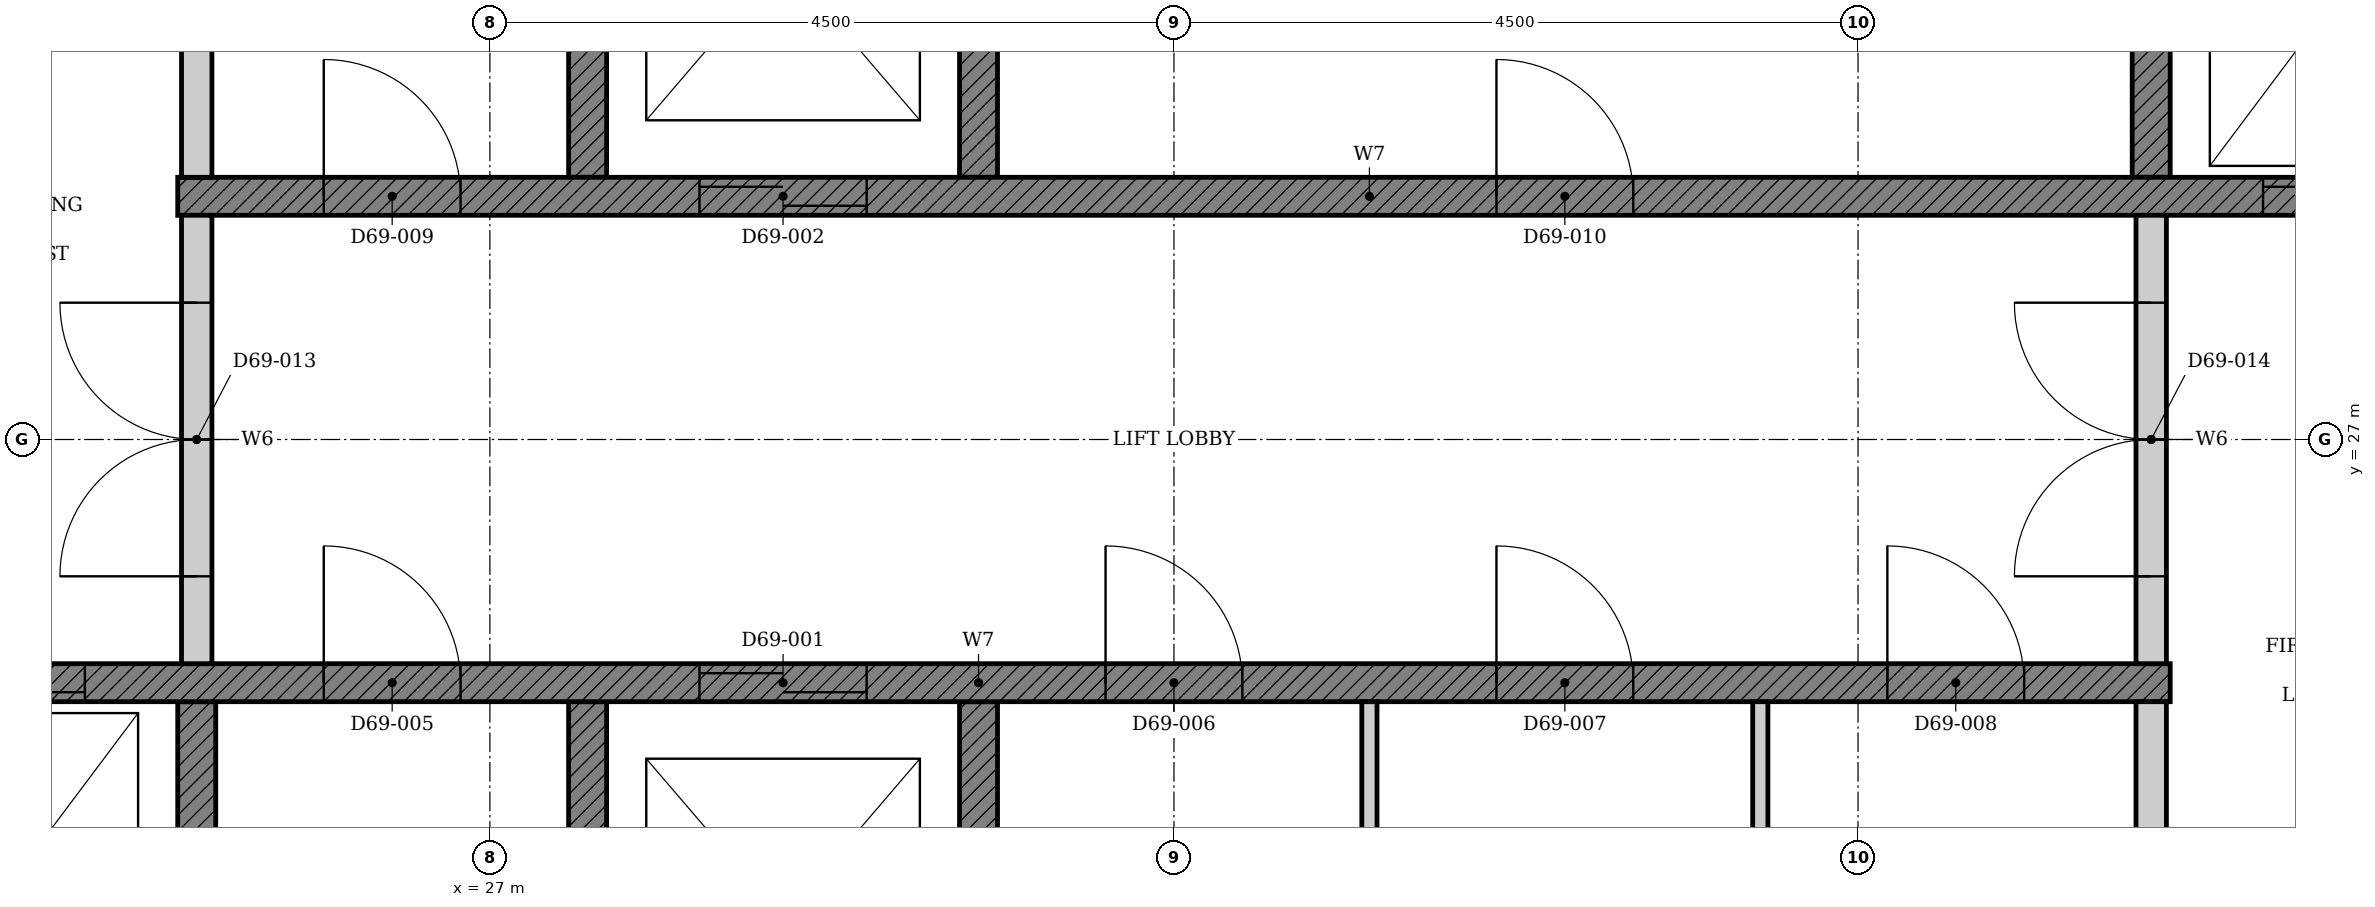
"""IFC4 building model, lengths in metres.
Left out: names, types, materials, properties, quantities, classifications, styles, units other than length and angle.
Written with IfcOpenShell. Run it as: python <this file> out.ifc"""

import sys

from ifc_helpers import new_model, si_unit, direction, frame, frame_2d, origin, place, context, subcontext, project, spatial, polyline, rectangle, outline, extrude, element, fill, save


model = new_model("IFC4")
c1 = context("Model", 3, precision=1e-05, world=origin(), true_north=direction((0.0, 1.0)))
c2 = subcontext(c1, "Body", "Model", "MODEL_VIEW")
j1 = project(units=[si_unit("LENGTHUNIT", "METRE"), si_unit("PLANEANGLEUNIT", "RADIAN")], contexts=[c1])
p1 = place(None, origin())
s1 = spatial("IfcSite", under=j1, at=p1, CompositionType="ELEMENT")
p2 = place(p1, origin())
s2 = spatial("IfcBuilding", under=s1, at=p2, CompositionType="ELEMENT")
p3 = place(p2, frame((0.0, 0.0, 271.2)))
s3 = spatial("IfcBuildingStorey", under=s2, at=p3, CompositionType="ELEMENT", Elevation=271.2)
p4 = place(p3, origin())
e1 = element("IfcWall", 1, at=p4, inside=s3, PredefinedType="SHEAR", context=c2, shape_type="SweptSolid", body=[
    extrude(outline(polyline([(22.375, 22.35), (25.197, 22.35), (25.197, 25.275), (24.947, 25.275), (24.947, 22.65), (22.625, 22.65), (22.625, 25.275), (22.375, 25.275), (22.375, 22.35)])), origin(), (0.0, 0.0, 1.0), 3.4),
])
p5 = place(p3, origin())
e2 = element("IfcWall", 2, at=p5, inside=s3, PredefinedType="SHEAR", context=c2, shape_type="SweptSolid", body=[
    extrude(outline(polyline([(27.518, 22.35), (30.339, 22.35), (30.339, 25.275), (30.089, 25.275), (30.089, 22.65), (27.768, 22.65), (27.768, 25.275), (27.518, 25.275), (27.518, 22.35)])), origin(), (0.0, 0.0, 1.0), 3.4),
])
p6 = place(p3, origin())
e3 = element("IfcWall", 3, at=p6, inside=s3, PredefinedType="SHEAR", context=c2, shape_type="SweptSolid", body=[
    extrude(outline(polyline([(27.518, 28.725), (27.768, 28.725), (27.768, 31.35), (30.089, 31.35), (30.089, 28.725), (30.339, 28.725), (30.339, 31.65), (27.518, 31.65), (27.518, 28.725)])), origin(), (0.0, 0.0, 1.0), 3.4),
])
p7 = place(p3, origin())
e4 = element("IfcWall", 4, at=p7, inside=s3, PredefinedType="SHEAR", context=c2, shape_type="SweptSolid", body=[
    extrude(outline(polyline([(37.803, 28.725), (38.053, 28.725), (38.053, 31.35), (40.375, 31.35), (40.375, 28.725), (40.625, 28.725), (40.625, 31.65), (37.803, 31.65), (37.803, 28.725)])), origin(), (0.0, 0.0, 1.0), 3.4),
])
p8 = place(p3, frame((22.375, 25.4, 0.0), z_axis=(0.0, 0.0, 1.0), x_axis=(1.0, 0.0, 0.0)))
e5 = element("IfcWall", 5, at=p8, inside=s3, PredefinedType="SHEAR", context=c2, shape_type="SweptSolid", body=[
    extrude(rectangle(XDim=15.678, YDim=0.25, at=frame_2d((7.839, 0.0))), origin(), (0.0, 0.0, 1.0), 3.4),
])
p9 = place(p8, frame((6.004, 0.0, 0.0)))
e6 = element("IfcOpeningElement", 6, at=p9, cuts=e5, PredefinedType="OPENING", context=c2, shape_type="SweptSolid", body=[
    extrude(rectangle(XDim=1.1, YDim=2.1, at=frame_2d((0.55, 1.05))), frame((0.0, 0.135, 0.0), z_axis=(0.0, -1.0, 0.0), x_axis=(1.0, 0.0, 0.0)), (0.0, 0.0, 1.0), 0.27),
])
p10 = place(p8, frame((0.861, 0.0, 0.0)))
e7 = element("IfcOpeningElement", 7, at=p10, cuts=e5, PredefinedType="OPENING", context=c2, shape_type="SweptSolid", body=[
    extrude(rectangle(XDim=1.1, YDim=2.1, at=frame_2d((0.55, 1.05))), frame((0.0, 0.135, 0.0), z_axis=(0.0, -1.0, 0.0), x_axis=(1.0, 0.0, 0.0)), (0.0, 0.0, 1.0), 0.27),
])
p11 = place(p8, frame((3.532, 0.0, 0.0)))
e8 = element("IfcOpeningElement", 8, at=p11, cuts=e5, PredefinedType="OPENING", context=c2, shape_type="SweptSolid", body=[
    extrude(rectangle(XDim=0.9, YDim=2.1, at=frame_2d((0.45, 1.05))), frame((0.0, 0.135, 0.0), z_axis=(0.0, -1.0, 0.0), x_axis=(1.0, 0.0, 0.0)), (0.0, 0.0, 1.0), 0.27),
])
p12 = place(p8, frame((8.675, 0.0, 0.0)))
e9 = element("IfcOpeningElement", 9, at=p12, cuts=e5, PredefinedType="OPENING", context=c2, shape_type="SweptSolid", body=[
    extrude(rectangle(XDim=0.9, YDim=2.1, at=frame_2d((0.45, 1.05))), frame((0.0, 0.135, 0.0), z_axis=(0.0, -1.0, 0.0), x_axis=(1.0, 0.0, 0.0)), (0.0, 0.0, 1.0), 0.27),
])
p13 = place(p8, frame((11.246, 0.0, 0.0)))
e10 = element("IfcOpeningElement", 10, at=p13, cuts=e5, PredefinedType="OPENING", context=c2, shape_type="SweptSolid", body=[
    extrude(rectangle(XDim=0.9, YDim=2.1, at=frame_2d((0.45, 1.05))), frame((0.0, 0.135, 0.0), z_axis=(0.0, -1.0, 0.0), x_axis=(1.0, 0.0, 0.0)), (0.0, 0.0, 1.0), 0.27),
])
p14 = place(p8, frame((13.818, 0.0, 0.0)))
e11 = element("IfcOpeningElement", 11, at=p14, cuts=e5, PredefinedType="OPENING", context=c2, shape_type="SweptSolid", body=[
    extrude(rectangle(XDim=0.9, YDim=2.1, at=frame_2d((0.45, 1.05))), frame((0.0, 0.135, 0.0), z_axis=(0.0, -1.0, 0.0), x_axis=(1.0, 0.0, 0.0)), (0.0, 0.0, 1.0), 0.27),
])
p15 = place(p3, frame((24.947, 28.6, 0.0), z_axis=(0.0, 0.0, 1.0), x_axis=(1.0, 0.0, 0.0)))
e12 = element("IfcWall", 12, at=p15, inside=s3, PredefinedType="SHEAR", context=c2, shape_type="SweptSolid", body=[
    extrude(rectangle(XDim=15.678, YDim=0.25, at=frame_2d((7.839, 0.0))), origin(), (0.0, 0.0, 1.0), 3.4),
])
p16 = place(p15, frame((3.432, 0.0, 0.0)))
e13 = element("IfcOpeningElement", 13, at=p16, cuts=e12, PredefinedType="OPENING", context=c2, shape_type="SweptSolid", body=[
    extrude(rectangle(XDim=1.1, YDim=2.1, at=frame_2d((0.55, 1.05))), frame((0.0, 0.135, 0.0), z_axis=(0.0, -1.0, 0.0), x_axis=(1.0, 0.0, 0.0)), (0.0, 0.0, 1.0), 0.27),
])
p17 = place(p15, frame((13.718, 0.0, 0.0)))
e14 = element("IfcOpeningElement", 14, at=p17, cuts=e12, PredefinedType="OPENING", context=c2, shape_type="SweptSolid", body=[
    extrude(rectangle(XDim=1.1, YDim=2.1, at=frame_2d((0.55, 1.05))), frame((0.0, 0.135, 0.0), z_axis=(0.0, -1.0, 0.0), x_axis=(1.0, 0.0, 0.0)), (0.0, 0.0, 1.0), 0.27),
])
p18 = place(p15, frame((0.961, 0.0, 0.0)))
e15 = element("IfcOpeningElement", 15, at=p18, cuts=e12, PredefinedType="OPENING", context=c2, shape_type="SweptSolid", body=[
    extrude(rectangle(XDim=0.9, YDim=2.1, at=frame_2d((0.45, 1.05))), frame((0.0, 0.135, 0.0), z_axis=(0.0, -1.0, 0.0), x_axis=(1.0, 0.0, 0.0)), (0.0, 0.0, 1.0), 0.27),
])
p19 = place(p15, frame((8.675, 0.0, 0.0)))
e16 = element("IfcOpeningElement", 16, at=p19, cuts=e12, PredefinedType="OPENING", context=c2, shape_type="SweptSolid", body=[
    extrude(rectangle(XDim=0.9, YDim=2.1, at=frame_2d((0.45, 1.05))), frame((0.0, 0.135, 0.0), z_axis=(0.0, -1.0, 0.0), x_axis=(1.0, 0.0, 0.0)), (0.0, 0.0, 1.0), 0.27),
])
p20 = place(p3, frame((37.928, 22.65, 0.0), z_axis=(0.0, 0.0, 1.0), x_axis=(0.0, 1.0, 0.0)))
e17 = element("IfcWall", 17, at=p20, inside=s3, PredefinedType="PARTITIONING", context=c2, shape_type="SweptSolid", body=[
    extrude(rectangle(XDim=2.625, YDim=0.2, at=frame_2d((1.312, 0.0))), origin(), (0.0, 0.0, 1.0), 3.4),
])
for number, where, z_axis, x_axis in (
    (18, (32.786, 22.65, 0.0), (0.0, 0.0, 1.0), (0.0, 1.0, 0.0)),
    (19, (35.357, 22.65, 0.0), (0.0, 0.0, 1.0), (0.0, 1.0, 0.0)),
):
    element("IfcWall", number, at=place(p3, frame(where, z_axis=z_axis, x_axis=x_axis)), inside=s3, PredefinedType="PARTITIONING", context=c2, shape_type="SweptSolid", body=[
        extrude(rectangle(XDim=2.625, YDim=0.1, at=frame_2d((1.312, 0.0))), origin(), (0.0, 0.0, 1.0), 3.4),
    ])
p21 = place(p3, frame((25.072, 28.725, 0.0), z_axis=(0.0, 0.0, 1.0), x_axis=(0.0, 1.0, 0.0)))
e20 = element("IfcWall", 20, at=p21, inside=s3, PredefinedType="PARTITIONING", context=c2, shape_type="SweptSolid", body=[
    extrude(rectangle(XDim=2.625, YDim=0.2, at=frame_2d((1.312, 0.0))), origin(), (0.0, 0.0, 1.0), 3.4),
])
p22 = place(p3, frame((25.072, 25.525, 0.0), z_axis=(0.0, 0.0, 1.0), x_axis=(0.0, 1.0, 0.0)))
e21 = element("IfcWall", 21, at=p22, inside=s3, PredefinedType="PARTITIONING", context=c2, shape_type="SweptSolid", body=[
    extrude(rectangle(XDim=2.95, YDim=0.2, at=frame_2d((1.475, 0.0))), origin(), (0.0, 0.0, 1.0), 3.4),
])
p23 = place(p22, frame((0.575, 0.0, 0.0)))
e22 = element("IfcOpeningElement", 22, at=p23, cuts=e21, PredefinedType="OPENING", context=c2, shape_type="SweptSolid", body=[
    extrude(rectangle(XDim=1.8, YDim=2.1, at=frame_2d((0.9, 1.05))), frame((0.0, 0.11, 0.0), z_axis=(0.0, -1.0, 0.0), x_axis=(1.0, 0.0, 0.0)), (0.0, 0.0, 1.0), 0.22),
])
p24 = place(p3, frame((37.928, 25.525, 0.0), z_axis=(0.0, 0.0, 1.0), x_axis=(0.0, 1.0, 0.0)))
e23 = element("IfcWall", 23, at=p24, inside=s3, PredefinedType="PARTITIONING", context=c2, shape_type="SweptSolid", body=[
    extrude(rectangle(XDim=2.95, YDim=0.2, at=frame_2d((1.475, 0.0))), origin(), (0.0, 0.0, 1.0), 3.4),
])
p25 = place(p24, frame((0.575, 0.0, 0.0)))
e24 = element("IfcOpeningElement", 24, at=p25, cuts=e23, PredefinedType="OPENING", context=c2, shape_type="SweptSolid", body=[
    extrude(rectangle(XDim=1.8, YDim=2.1, at=frame_2d((0.9, 1.05))), frame((0.0, 0.11, 0.0), z_axis=(0.0, -1.0, 0.0), x_axis=(1.0, 0.0, 0.0)), (0.0, 0.0, 1.0), 0.22),
])
p26 = place(p9, origin())
e25 = element("IfcDoor", 25, at=p26, inside=s3, OperationType="DOUBLE_DOOR_SLIDING", PredefinedType="DOOR", context=c2, shape_type="SweptSolid", body=[
    extrude(rectangle(XDim=1.1, YDim=2.1, at=frame_2d((0.55, 1.05))), frame((0.0, 0.025, 0.0), z_axis=(0.0, -1.0, 0.0), x_axis=(1.0, 0.0, 0.0)), (0.0, 0.0, 1.0), 0.05),
])
fill(e6, e25)
p27 = place(p16, origin())
e26 = element("IfcDoor", 26, at=p27, inside=s3, OperationType="DOUBLE_DOOR_SLIDING", PredefinedType="DOOR", context=c2, shape_type="SweptSolid", body=[
    extrude(rectangle(XDim=1.1, YDim=2.1, at=frame_2d((0.55, 1.05))), frame((0.0, 0.025, 0.0), z_axis=(0.0, -1.0, 0.0), x_axis=(1.0, 0.0, 0.0)), (0.0, 0.0, 1.0), 0.05),
])
fill(e13, e26)
p28 = place(p10, origin())
e27 = element("IfcDoor", 27, at=p28, inside=s3, OperationType="DOUBLE_DOOR_SLIDING", PredefinedType="DOOR", context=c2, shape_type="SweptSolid", body=[
    extrude(rectangle(XDim=1.1, YDim=2.1, at=frame_2d((0.55, 1.05))), frame((0.0, 0.025, 0.0), z_axis=(0.0, -1.0, 0.0), x_axis=(1.0, 0.0, 0.0)), (0.0, 0.0, 1.0), 0.05),
])
fill(e7, e27)
p29 = place(p17, origin())
e28 = element("IfcDoor", 28, at=p29, inside=s3, OperationType="DOUBLE_DOOR_SLIDING", PredefinedType="DOOR", context=c2, shape_type="SweptSolid", body=[
    extrude(rectangle(XDim=1.1, YDim=2.1, at=frame_2d((0.55, 1.05))), frame((0.0, 0.025, 0.0), z_axis=(0.0, -1.0, 0.0), x_axis=(1.0, 0.0, 0.0)), (0.0, 0.0, 1.0), 0.05),
])
fill(e14, e28)
p30 = place(p11, origin())
e29 = element("IfcDoor", 29, at=p30, inside=s3, OperationType="SINGLE_SWING_LEFT", PredefinedType="DOOR", context=c2, shape_type="SweptSolid", body=[
    extrude(rectangle(XDim=0.9, YDim=2.1, at=frame_2d((0.45, 1.05))), frame((0.0, 0.025, 0.0), z_axis=(0.0, -1.0, 0.0), x_axis=(1.0, 0.0, 0.0)), (0.0, 0.0, 1.0), 0.05),
])
fill(e8, e29)
p31 = place(p12, origin())
e30 = element("IfcDoor", 30, at=p31, inside=s3, OperationType="SINGLE_SWING_LEFT", PredefinedType="DOOR", context=c2, shape_type="SweptSolid", body=[
    extrude(rectangle(XDim=0.9, YDim=2.1, at=frame_2d((0.45, 1.05))), frame((0.0, 0.025, 0.0), z_axis=(0.0, -1.0, 0.0), x_axis=(1.0, 0.0, 0.0)), (0.0, 0.0, 1.0), 0.05),
])
fill(e9, e30)
p32 = place(p13, origin())
e31 = element("IfcDoor", 31, at=p32, inside=s3, OperationType="SINGLE_SWING_LEFT", PredefinedType="DOOR", context=c2, shape_type="SweptSolid", body=[
    extrude(rectangle(XDim=0.9, YDim=2.1, at=frame_2d((0.45, 1.05))), frame((0.0, 0.025, 0.0), z_axis=(0.0, -1.0, 0.0), x_axis=(1.0, 0.0, 0.0)), (0.0, 0.0, 1.0), 0.05),
])
fill(e10, e31)
p33 = place(p14, origin())
e32 = element("IfcDoor", 32, at=p33, inside=s3, OperationType="SINGLE_SWING_LEFT", PredefinedType="DOOR", context=c2, shape_type="SweptSolid", body=[
    extrude(rectangle(XDim=0.9, YDim=2.1, at=frame_2d((0.45, 1.05))), frame((0.0, 0.025, 0.0), z_axis=(0.0, -1.0, 0.0), x_axis=(1.0, 0.0, 0.0)), (0.0, 0.0, 1.0), 0.05),
])
fill(e11, e32)
p34 = place(p18, origin())
e33 = element("IfcDoor", 33, at=p34, inside=s3, OperationType="SINGLE_SWING_LEFT", PredefinedType="DOOR", context=c2, shape_type="SweptSolid", body=[
    extrude(rectangle(XDim=0.9, YDim=2.1, at=frame_2d((0.45, 1.05))), frame((0.0, 0.025, 0.0), z_axis=(0.0, -1.0, 0.0), x_axis=(1.0, 0.0, 0.0)), (0.0, 0.0, 1.0), 0.05),
])
fill(e15, e33)
p35 = place(p19, origin())
e34 = element("IfcDoor", 34, at=p35, inside=s3, OperationType="SINGLE_SWING_LEFT", PredefinedType="DOOR", context=c2, shape_type="SweptSolid", body=[
    extrude(rectangle(XDim=0.9, YDim=2.1, at=frame_2d((0.45, 1.05))), frame((0.0, 0.025, 0.0), z_axis=(0.0, -1.0, 0.0), x_axis=(1.0, 0.0, 0.0)), (0.0, 0.0, 1.0), 0.05),
])
fill(e16, e34)
p36 = place(p23, origin())
e35 = element("IfcDoor", 35, at=p36, inside=s3, OperationType="DOUBLE_DOOR_SINGLE_SWING", PredefinedType="DOOR", context=c2, shape_type="SweptSolid", body=[
    extrude(rectangle(XDim=1.8, YDim=2.1, at=frame_2d((0.9, 1.05))), frame((0.0, 0.025, 0.0), z_axis=(0.0, -1.0, 0.0), x_axis=(1.0, 0.0, 0.0)), (0.0, 0.0, 1.0), 0.05),
])
fill(e22, e35)
p37 = place(p25, origin())
e36 = element("IfcDoor", 36, at=p37, inside=s3, OperationType="DOUBLE_DOOR_SINGLE_SWING", PredefinedType="DOOR", context=c2, shape_type="SweptSolid", body=[
    extrude(rectangle(XDim=1.8, YDim=2.1, at=frame_2d((0.9, 1.05))), frame((0.0, 0.025, 0.0), z_axis=(0.0, -1.0, 0.0), x_axis=(1.0, 0.0, 0.0)), (0.0, 0.0, 1.0), 0.05),
])
fill(e24, e36)
save(model, sys.argv[1])
